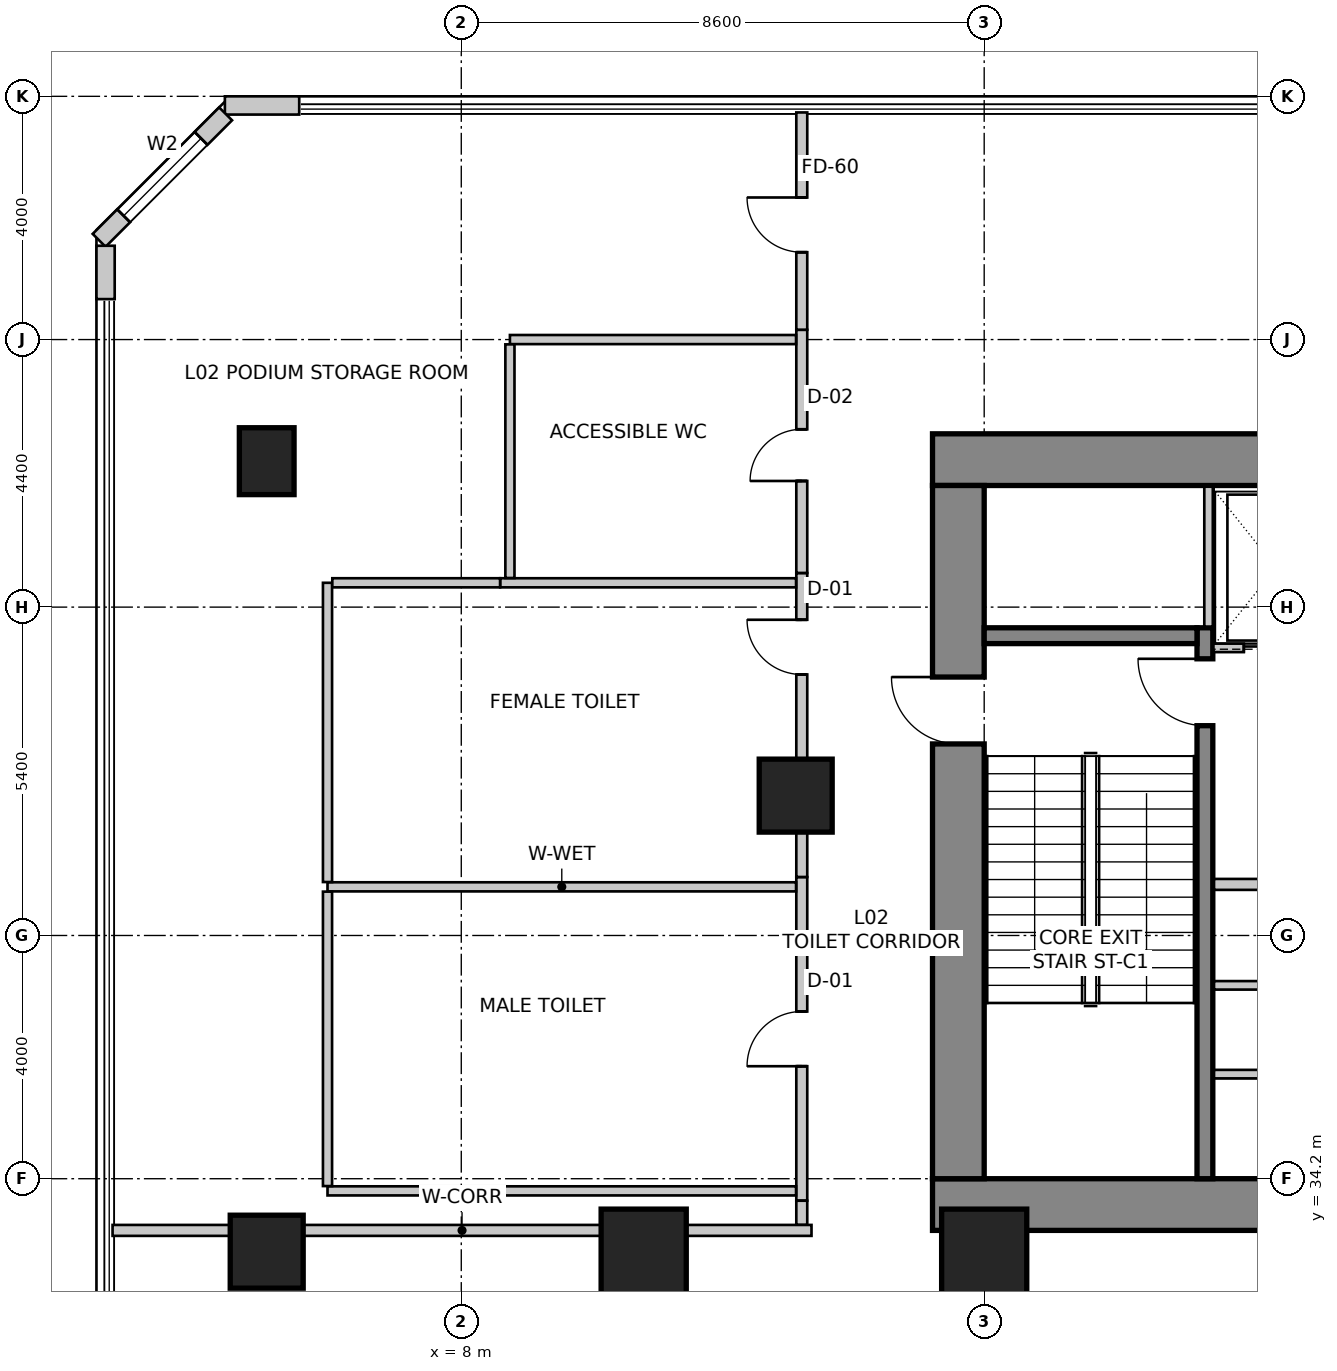
"""IFC4 building model, lengths in metres.
Left out: names, types, materials, properties, quantities, classifications, styles, units other than length and angle.
Written with IfcOpenShell. Run it as: python <this file> out.ifc"""

import sys

from ifc_helpers import new_model, si_unit, direction, frame, frame_2d, origin, origin_2d, place, context, subcontext, project, spatial, rectangle, extrude, source, transform, mapped, element, fill, save


model = new_model("IFC4")
c1 = context("Model", 3, precision=1e-05, world=origin(), true_north=direction((0.0, 1.0)))
c2 = subcontext(c1, "Body", "Model", "MODEL_VIEW")
j1 = project(units=[si_unit("LENGTHUNIT", "METRE"), si_unit("PLANEANGLEUNIT", "RADIAN")], contexts=[c1])
p1 = place(None, origin())
s1 = spatial("IfcSite", under=j1, at=p1, CompositionType="ELEMENT")
p2 = place(p1, origin())
s2 = spatial("IfcBuilding", under=s1, at=p2, CompositionType="ELEMENT")
p3 = place(p2, frame((0.0, 0.0, 6.0)))
s3 = spatial("IfcBuildingStorey", under=s2, at=p3, CompositionType="ELEMENT", Elevation=6.0)
p4 = place(p3, frame((15.75, 46.025, 0.0), z_axis=(0.0, 0.0, 1.0), x_axis=(1.0, 0.0, 0.0)))
e1 = element("IfcWall", 1, at=p4, inside=s3, PredefinedType="SHEAR", context=c2, shape_type="SweptSolid", body=[
    extrude(rectangle(XDim=16.1, YDim=0.85, at=frame_2d((8.05, 0.0))), origin(), (0.0, 0.0, 1.0), 5.2),
])
p5 = place(p3, frame((15.75, 33.775, 0.0), z_axis=(0.0, 0.0, 1.0), x_axis=(1.0, 0.0, 0.0)))
e2 = element("IfcWall", 2, at=p5, inside=s3, PredefinedType="SHEAR", context=c2, shape_type="SweptSolid", body=[
    extrude(rectangle(XDim=16.1, YDim=0.85, at=frame_2d((8.05, 0.0))), origin(), (0.0, 0.0, 1.0), 5.2),
])
m1 = source(origin(), c2, "Body", "SweptSolid", [
    extrude(rectangle(XDim=1.3, YDim=2.15, at=frame_2d((0.65, 1.075))), frame((0.0, 0.435, 0.0), z_axis=(0.0, -1.0, 0.0), x_axis=(1.0, 0.0, 0.0)), (0.0, 0.0, 1.0), 0.87),
])
p6 = place(p5, frame((10.18, 0.0, 0.0)))
e3 = element("IfcOpeningElement", 3, at=p6, cuts=e2, PredefinedType="OPENING", context=c2, shape_type="MappedRepresentation", body=[
    mapped(m1, transform((0.0, 0.0, 0.0), scale=1.0)),
])
p7 = place(p3, frame((16.175, 34.2, 0.0), z_axis=(0.0, 0.0, 1.0), x_axis=(0.0, 1.0, 0.0)))
e4 = element("IfcWall", 4, at=p7, inside=s3, PredefinedType="SHEAR", context=c2, shape_type="SweptSolid", body=[
    extrude(rectangle(XDim=11.4, YDim=0.85, at=frame_2d((5.7, 0.0))), origin(), (0.0, 0.0, 1.0), 5.2),
])
m2 = source(origin(), c2, "Body", "SweptSolid", [
    extrude(rectangle(XDim=1.1, YDim=2.15, at=frame_2d((0.55, 1.075))), frame((0.0, 0.435, 0.0), z_axis=(0.0, -1.0, 0.0), x_axis=(1.0, 0.0, 0.0)), (0.0, 0.0, 1.0), 0.87),
])
p8 = place(p7, frame((7.15, 0.0, 0.0)))
e5 = element("IfcOpeningElement", 5, at=p8, cuts=e4, PredefinedType="OPENING", context=c2, shape_type="MappedRepresentation", body=[
    mapped(m2, transform((0.0, 0.0, 0.0), scale=1.0)),
])
p9 = place(p3, frame((20.23, 34.2, 0.0), z_axis=(0.0, 0.0, 1.0), x_axis=(0.0, 1.0, 0.0)))
e6 = element("IfcWall", 6, at=p9, inside=s3, PredefinedType="SHEAR", context=c2, shape_type="SweptSolid", body=[
    extrude(rectangle(XDim=9.06, YDim=0.26, at=frame_2d((4.53, 0.0))), origin(), (0.0, 0.0, 1.0), 5.2),
])
m3 = source(origin(), c2, "Body", "SweptSolid", [
    extrude(rectangle(XDim=1.1, YDim=2.15, at=frame_2d((0.55, 1.075))), frame((0.0, 0.14, 0.0), z_axis=(0.0, -1.0, 0.0), x_axis=(1.0, 0.0, 0.0)), (0.0, 0.0, 1.0), 0.28),
])
p10 = place(p9, frame((7.45, 0.0, 0.0)))
e7 = element("IfcOpeningElement", 7, at=p10, cuts=e6, PredefinedType="OPENING", context=c2, shape_type="MappedRepresentation", body=[
    mapped(m3, transform((0.0, 0.0, 0.0), scale=1.0)),
])
p11 = place(p3, frame((16.6, 43.13, 0.0), z_axis=(0.0, 0.0, 1.0), x_axis=(1.0, 0.0, 0.0)))
e8 = element("IfcWall", 8, at=p11, inside=s3, PredefinedType="SHEAR", context=c2, shape_type="SweptSolid", body=[
    extrude(rectangle(XDim=3.5, YDim=0.26, at=frame_2d((1.75, 0.0))), origin(), (0.0, 0.0, 1.0), 5.2),
])
m4 = source(origin(), c2, "Body", "SweptSolid", [
    extrude(rectangle(XDim=1.2, YDim=1.2, at=origin_2d()), origin(), (0.0, 0.0, 1.0), 5.2),
])
p12 = place(p3, frame((4.8, 33.0, 0.0), z_axis=(0.0, 0.0, 1.0), x_axis=(1.0, 0.0, 0.0)))
e9 = element("IfcColumn", 9, at=p12, inside=s3, PredefinedType="COLUMN", context=c2, shape_type="MappedRepresentation", body=[
    mapped(m4, transform((0.0, 0.0, 0.0), scale=1.0)),
])
m5 = source(origin(), c2, "Body", "SweptSolid", [
    extrude(rectangle(XDim=1.4, YDim=1.4, at=origin_2d()), origin(), (0.0, 0.0, 1.0), 5.2),
])
for number, where, z_axis, x_axis in (
    (10, (11.0, 33.0, 0.0), (0.0, 0.0, 1.0), (1.0, 0.0, 0.0)),
    (11, (16.6, 33.0, 0.0), (0.0, 0.0, 1.0), (1.0, 0.0, 0.0)),
):
    element("IfcColumn", number, at=place(p3, frame(where, z_axis=z_axis, x_axis=x_axis)), inside=s3, PredefinedType="COLUMN", context=c2, shape_type="MappedRepresentation", body=[
        mapped(m5, transform((0.0, 0.0, 0.0), scale=1.0)),
    ])
m6 = source(origin(), c2, "Body", "SweptSolid", [
    extrude(rectangle(XDim=0.9, YDim=1.1, at=origin_2d()), origin(), (0.0, 0.0, 1.0), 5.2),
])
p13 = place(p3, frame((4.8, 46.0, 0.0), z_axis=(0.0, 0.0, 1.0), x_axis=(1.0, 0.0, 0.0)))
e12 = element("IfcColumn", 12, at=p13, inside=s3, PredefinedType="COLUMN", context=c2, shape_type="MappedRepresentation", body=[
    mapped(m6, transform((0.0, 0.0, 0.0), scale=1.0)),
])
p14 = place(p3, frame((13.5, 40.5, 0.0), z_axis=(0.0, 0.0, 1.0), x_axis=(1.0, 0.0, 0.0)))
e13 = element("IfcColumn", 13, at=p14, inside=s3, PredefinedType="COLUMN", context=c2, shape_type="MappedRepresentation", body=[
    mapped(m4, transform((0.0, 0.0, 0.0), scale=1.0)),
])
p15 = place(p3, frame((5.335, 51.85, 0.0), z_axis=(0.0, 0.0, 1.0), x_axis=(-1.0, 0.0, 0.0)))
e14 = element("IfcWall", 14, at=p15, inside=s3, PredefinedType="SOLIDWALL", context=c2, shape_type="SweptSolid", body=[
    extrude(rectangle(XDim=1.223, YDim=0.3, at=frame_2d((0.611, 0.0))), origin(), (0.0, 0.0, 1.0), 4.9),
])
p16 = place(p3, frame((4.124, 51.712, 0.0), z_axis=(0.0, 0.0, 1.0), x_axis=(-0.707106781187, -0.707106781187, 0.0)))
e15 = element("IfcWall", 15, at=p16, inside=s3, PredefinedType="SOLIDWALL", context=c2, shape_type="SweptSolid", body=[
    extrude(rectangle(XDim=2.942, YDim=0.3, at=frame_2d((1.471, 0.0))), origin(), (0.0, 0.0, 1.0), 4.9),
])
m7 = source(origin(), c2, "Body", "SweptSolid", [
    extrude(rectangle(XDim=1.8, YDim=2.1, at=frame_2d((0.9, 1.05))), frame((0.0, 0.16, 0.0), z_axis=(0.0, -1.0, 0.0), x_axis=(1.0, 0.0, 0.0)), (0.0, 0.0, 1.0), 0.32),
])
p17 = place(p16, frame((0.571, 0.0, 0.85)))
e16 = element("IfcOpeningElement", 16, at=p17, cuts=e15, PredefinedType="OPENING", context=c2, shape_type="MappedRepresentation", body=[
    mapped(m7, transform((0.0, 0.0, 0.0), scale=1.0)),
])
p18 = place(p3, frame((2.15, 49.543, 0.0), z_axis=(0.0, 0.0, 1.0), x_axis=(0.0, -1.0, 0.0)))
e17 = element("IfcWall", 17, at=p18, inside=s3, PredefinedType="SOLIDWALL", context=c2, shape_type="SweptSolid", body=[
    extrude(rectangle(XDim=0.877, YDim=0.3, at=frame_2d((0.439, 0.0))), origin(), (0.0, 0.0, 1.0), 4.9),
])
p19 = place(p3, frame((20.37, 42.93, 0.0), z_axis=(0.0, 0.0, 1.0), x_axis=(1.0, 0.0, 0.0)))
e18 = element("IfcWall", 18, at=p19, inside=s3, PredefinedType="SOLIDWALL", context=c2, shape_type="SweptSolid", body=[
    extrude(rectangle(XDim=6.86, YDim=0.14, at=frame_2d((3.43, 0.0))), origin(), (0.0, 0.0, 1.0), 4.9),
])
m8 = source(origin(), c2, "Body", "SweptSolid", [
    extrude(rectangle(XDim=1.1, YDim=2.15, at=frame_2d((0.55, 1.075))), frame((0.0, 0.08, 0.0), z_axis=(0.0, -1.0, 0.0), x_axis=(1.0, 0.0, 0.0)), (0.0, 0.0, 1.0), 0.16),
])
p20 = place(p19, frame((0.5, 0.0, 0.0)))
e19 = element("IfcOpeningElement", 19, at=p20, cuts=e18, PredefinedType="OPENING", context=c2, shape_type="MappedRepresentation", body=[
    mapped(m8, transform((0.0, 0.0, 0.0), scale=1.0)),
])
p21 = place(p19, frame((2.7, 0.0, 0.0)))
e20 = element("IfcOpeningElement", 20, at=p21, cuts=e18, PredefinedType="OPENING", context=c2, shape_type="MappedRepresentation", body=[
    mapped(m8, transform((0.0, 0.0, 0.0), scale=1.0)),
])
p22 = place(p19, frame((5.1, 0.0, 0.0)))
e21 = element("IfcOpeningElement", 21, at=p22, cuts=e18, PredefinedType="OPENING", context=c2, shape_type="MappedRepresentation", body=[
    mapped(m8, transform((0.0, 0.0, 0.0), scale=1.0)),
])
p23 = place(p3, frame((20.29, 43.28, 0.0), z_axis=(0.0, 0.0, 1.0), x_axis=(0.0, 1.0, 0.0)))
e22 = element("IfcWall", 22, at=p23, inside=s3, PredefinedType="SOLIDWALL", context=c2, shape_type="SweptSolid", body=[
    extrude(rectangle(XDim=2.3, YDim=0.14, at=frame_2d((1.15, 0.0))), origin(), (0.0, 0.0, 1.0), 4.9),
])
p24 = place(p3, frame((20.38, 35.92, 0.0), z_axis=(0.0, 0.0, 1.0), x_axis=(1.0, 0.0, 0.0)))
e23 = element("IfcWall", 23, at=p24, inside=s3, PredefinedType="SOLIDWALL", context=c2, shape_type="SweptSolid", body=[
    extrude(rectangle(XDim=5.65, YDim=0.14, at=frame_2d((2.825, 0.0))), origin(), (0.0, 0.0, 1.0), 4.9),
])
p25 = place(p3, frame((20.38, 37.38, 0.0), z_axis=(0.0, 0.0, 1.0), x_axis=(1.0, 0.0, 0.0)))
e24 = element("IfcWall", 24, at=p25, inside=s3, PredefinedType="SOLIDWALL", context=c2, shape_type="SweptSolid", body=[
    extrude(rectangle(XDim=5.75, YDim=0.14, at=frame_2d((2.875, 0.0))), origin(), (0.0, 0.0, 1.0), 4.9),
])
p26 = place(p3, frame((20.38, 39.04, 0.0), z_axis=(0.0, 0.0, 1.0), x_axis=(1.0, 0.0, 0.0)))
e25 = element("IfcWall", 25, at=p26, inside=s3, PredefinedType="SOLIDWALL", context=c2, shape_type="SweptSolid", body=[
    extrude(rectangle(XDim=5.75, YDim=0.18, at=frame_2d((2.875, 0.0))), origin(), (0.0, 0.0, 1.0), 4.9),
])
p27 = place(p3, frame((2.265, 33.35, 0.0), z_axis=(0.0, 0.0, 1.0), x_axis=(1.0, 0.0, 0.0)))
e26 = element("IfcWall", 26, at=p27, inside=s3, PredefinedType="PARTITIONING", context=c2, shape_type="SweptSolid", body=[
    extrude(rectangle(XDim=11.495, YDim=0.18, at=frame_2d((5.748, 0.0))), origin(), (0.0, 0.0, 1.0), 3.692),
])
p28 = place(p3, frame((13.6, 33.84, 0.0), z_axis=(0.0, 0.0, 1.0), x_axis=(0.0, 1.0, 0.0)))
e27 = element("IfcWall", 27, at=p28, inside=s3, PredefinedType="PARTITIONING", context=c2, shape_type="SweptSolid", body=[
    extrude(rectangle(XDim=5.32, YDim=0.18, at=frame_2d((2.66, 0.0))), origin(), (0.0, 0.0, 1.0), 4.9),
])
m9 = source(origin(), c2, "Body", "SweptSolid", [
    extrude(rectangle(XDim=0.9, YDim=2.15, at=frame_2d((0.45, 1.075))), frame((0.0, 0.1, 0.0), z_axis=(0.0, -1.0, 0.0), x_axis=(1.0, 0.0, 0.0)), (0.0, 0.0, 1.0), 0.2),
])
p29 = place(p28, frame((2.21, 0.0, 0.0)))
e28 = element("IfcOpeningElement", 28, at=p29, cuts=e27, PredefinedType="OPENING", context=c2, shape_type="MappedRepresentation", body=[
    mapped(m9, transform((0.0, 0.0, 0.0), scale=1.0)),
])
p30 = place(p3, frame((13.6, 39.162, 0.0), z_axis=(0.0, 0.0, 1.0), x_axis=(0.0, 1.0, 0.0)))
e29 = element("IfcWall", 29, at=p30, inside=s3, PredefinedType="PARTITIONING", context=c2, shape_type="SweptSolid", body=[
    extrude(rectangle(XDim=4.998, YDim=0.18, at=frame_2d((2.499, 0.0))), origin(), (0.0, 0.0, 1.0), 3.942),
])
p31 = place(p30, frame((3.33, 0.0, 0.0)))
e30 = element("IfcOpeningElement", 30, at=p31, cuts=e29, PredefinedType="OPENING", context=c2, shape_type="MappedRepresentation", body=[
    mapped(m9, transform((0.0, 0.0, 0.0), scale=1.0)),
])
p32 = place(p3, frame((13.6, 44.162, 0.0), z_axis=(0.0, 0.0, 1.0), x_axis=(0.0, 1.0, 0.0)))
e31 = element("IfcWall", 31, at=p32, inside=s3, PredefinedType="PARTITIONING", context=c2, shape_type="SweptSolid", body=[
    extrude(rectangle(XDim=3.998, YDim=0.18, at=frame_2d((1.999, 0.0))), origin(), (0.0, 0.0, 1.0), 4.9),
])
m10 = source(origin(), c2, "Body", "SweptSolid", [
    extrude(rectangle(XDim=0.85, YDim=2.15, at=frame_2d((0.425, 1.075))), frame((0.0, 0.1, 0.0), z_axis=(0.0, -1.0, 0.0), x_axis=(1.0, 0.0, 0.0)), (0.0, 0.0, 1.0), 0.2),
])
p33 = place(p32, frame((1.512, 0.0, 0.0)))
e32 = element("IfcOpeningElement", 32, at=p33, cuts=e31, PredefinedType="OPENING", context=c2, shape_type="MappedRepresentation", body=[
    mapped(m10, transform((0.0, 0.0, 0.0), scale=1.0)),
])
p34 = place(p3, frame((13.6, 48.162, 0.0), z_axis=(0.0, 0.0, 1.0), x_axis=(0.0, 1.0, 0.0)))
e33 = element("IfcWall", 33, at=p34, inside=s3, PredefinedType="PARTITIONING", context=c2, shape_type="SweptSolid", body=[
    extrude(rectangle(XDim=3.573, YDim=0.18, at=frame_2d((1.787, 0.0))), origin(), (0.0, 0.0, 1.0), 4.9),
])
p35 = place(p34, frame((1.274, 0.0, 0.0)))
e34 = element("IfcOpeningElement", 34, at=p35, cuts=e33, PredefinedType="OPENING", context=c2, shape_type="MappedRepresentation", body=[
    mapped(m9, transform((0.0, 0.0, 0.0), scale=1.0)),
])
p36 = place(p3, frame((13.6, 33.444, 0.0), z_axis=(0.0, 0.0, 1.0), x_axis=(0.0, 1.0, 0.0)))
e35 = element("IfcWall", 35, at=p36, inside=s3, PredefinedType="PARTITIONING", context=c2, shape_type="SweptSolid", body=[
    extrude(rectangle(XDim=0.394, YDim=0.18, at=frame_2d((0.197, 0.0))), origin(), (0.0, 0.0, 1.0), 4.9),
])
for number, where, z_axis, x_axis in (
    (36, (5.8, 39.0, 0.0), (0.0, 0.0, 1.0), (1.0, 0.0, 0.0)),
    (37, (13.506, 34.0, 0.0), (0.0, 0.0, 1.0), (-1.0, 0.0, 0.0)),
):
    element("IfcWall", number, at=place(p3, frame(where, z_axis=z_axis, x_axis=x_axis)), inside=s3, PredefinedType="PARTITIONING", context=c2, shape_type="SweptSolid", body=[
        extrude(rectangle(XDim=7.706, YDim=0.15, at=frame_2d((3.853, 0.0))), origin(), (0.0, 0.0, 1.0), 3.942),
    ])
p37 = place(p3, frame((5.8, 34.079, 0.0), z_axis=(0.0, 0.0, 1.0), x_axis=(0.0, 1.0, 0.0)))
e38 = element("IfcWall", 38, at=p37, inside=s3, PredefinedType="PARTITIONING", context=c2, shape_type="SweptSolid", body=[
    extrude(rectangle(XDim=4.842, YDim=0.15, at=frame_2d((2.421, 0.0))), origin(), (0.0, 0.0, 1.0), 4.9),
])
p38 = place(p3, frame((8.64, 44.0, 0.0), z_axis=(0.0, 0.0, 1.0), x_axis=(1.0, 0.0, 0.0)))
e39 = element("IfcWall", 39, at=p38, inside=s3, PredefinedType="PARTITIONING", context=c2, shape_type="SweptSolid", body=[
    extrude(rectangle(XDim=4.866, YDim=0.15, at=frame_2d((2.433, 0.0))), origin(), (0.0, 0.0, 1.0), 4.9),
])
p39 = place(p3, frame((5.8, 39.079, 0.0), z_axis=(0.0, 0.0, 1.0), x_axis=(0.0, 1.0, 0.0)))
e40 = element("IfcWall", 40, at=p39, inside=s3, PredefinedType="PARTITIONING", context=c2, shape_type="SweptSolid", body=[
    extrude(rectangle(XDim=4.921, YDim=0.15, at=frame_2d((2.46, 0.0))), origin(), (0.0, 0.0, 1.0), 4.9),
])
p40 = place(p3, frame((5.879, 44.0, 0.0), z_axis=(0.0, 0.0, 1.0), x_axis=(1.0, 0.0, 0.0)))
e41 = element("IfcWall", 41, at=p40, inside=s3, PredefinedType="PARTITIONING", context=c2, shape_type="SweptSolid", body=[
    extrude(rectangle(XDim=2.759, YDim=0.15, at=frame_2d((1.379, 0.0))), origin(), (0.0, 0.0, 1.0), 3.942),
])
p41 = place(p3, frame((8.8, 48.0, 0.0), z_axis=(0.0, 0.0, 1.0), x_axis=(1.0, 0.0, 0.0)))
e42 = element("IfcWall", 42, at=p41, inside=s3, PredefinedType="PARTITIONING", context=c2, shape_type="SweptSolid", body=[
    extrude(rectangle(XDim=4.706, YDim=0.15, at=frame_2d((2.353, 0.0))), origin(), (0.0, 0.0, 1.0), 4.9),
])
p42 = place(p3, frame((8.8, 44.079, 0.0), z_axis=(0.0, 0.0, 1.0), x_axis=(0.0, 1.0, 0.0)))
e43 = element("IfcWall", 43, at=p42, inside=s3, PredefinedType="PARTITIONING", context=c2, shape_type="SweptSolid", body=[
    extrude(rectangle(XDim=3.842, YDim=0.15, at=frame_2d((1.921, 0.0))), origin(), (0.0, 0.0, 1.0), 4.9),
])
m11 = source(origin(), c2, "Body", "SweptSolid", [
    extrude(rectangle(XDim=1.8, YDim=2.1, at=frame_2d((0.9, 1.05))), frame((0.0, -0.015, 0.0), z_axis=(0.0, -1.0, 0.0), x_axis=(1.0, 0.0, 0.0)), (0.0, 0.0, 1.0), 0.06),
])
p43 = place(p17, origin())
e44 = element("IfcWindow", 44, at=p43, inside=s3, PartitioningType="SINGLE_PANEL", PredefinedType="WINDOW", context=c2, shape_type="MappedRepresentation", body=[
    mapped(m11, transform((0.0, 0.0, 0.0), scale=1.0)),
])
fill(e16, e44)
m12 = source(origin(), c2, "Body", "SweptSolid", [
    extrude(rectangle(XDim=1.1, YDim=2.15, at=frame_2d((0.55, 1.075))), frame((0.0, 0.025, 0.0), z_axis=(0.0, -1.0, 0.0), x_axis=(1.0, 0.0, 0.0)), (0.0, 0.0, 1.0), 0.05),
])
p44 = place(p20, origin())
e45 = element("IfcDoor", 45, at=p44, inside=s3, OperationType="SLIDING_TO_LEFT", PredefinedType="DOOR", context=c2, shape_type="MappedRepresentation", body=[
    mapped(m12, transform((0.0, 0.0, 0.0), scale=1.0)),
])
fill(e19, e45)
m13 = source(origin(), c2, "Body", "SweptSolid", [
    extrude(rectangle(XDim=1.1, YDim=2.15, at=frame_2d((0.55, 1.075))), frame((0.0, 0.025, 0.0), z_axis=(0.0, -1.0, 0.0), x_axis=(1.0, 0.0, 0.0)), (0.0, 0.0, 1.0), 0.05),
])
p45 = place(p10, origin())
e46 = element("IfcDoor", 46, at=p45, inside=s3, OperationType="SINGLE_SWING_RIGHT", PredefinedType="DOOR", context=c2, shape_type="MappedRepresentation", body=[
    mapped(m13, transform((0.0, 0.0, 0.0), scale=1.0)),
])
fill(e7, e46)
p46 = place(p8, origin())
e47 = element("IfcDoor", 47, at=p46, inside=s3, OperationType="SINGLE_SWING_RIGHT", PredefinedType="DOOR", context=c2, shape_type="MappedRepresentation", body=[
    mapped(m13, transform((0.0, 0.0, 0.0), scale=1.0)),
])
fill(e5, e47)
m14 = source(origin(), c2, "Body", "SweptSolid", [
    extrude(rectangle(XDim=0.9, YDim=2.15, at=frame_2d((0.45, 1.075))), frame((0.0, 0.025, 0.0), z_axis=(0.0, -1.0, 0.0), x_axis=(1.0, 0.0, 0.0)), (0.0, 0.0, 1.0), 0.05),
])
p47 = place(p29, origin())
e48 = element("IfcDoor", 48, at=p47, inside=s3, OperationType="SINGLE_SWING_LEFT", PredefinedType="DOOR", context=c2, shape_type="MappedRepresentation", body=[
    mapped(m14, transform((0.0, 0.0, 0.0), scale=1.0)),
])
fill(e28, e48)
p48 = place(p31, origin())
e49 = element("IfcDoor", 49, at=p48, inside=s3, OperationType="SINGLE_SWING_RIGHT", PredefinedType="DOOR", context=c2, shape_type="MappedRepresentation", body=[
    mapped(m14, transform((0.0, 0.0, 0.0), scale=1.0)),
])
fill(e30, e49)
m15 = source(origin(), c2, "Body", "SweptSolid", [
    extrude(rectangle(XDim=0.85, YDim=2.15, at=frame_2d((0.425, 1.075))), frame((0.0, 0.025, 0.0), z_axis=(0.0, -1.0, 0.0), x_axis=(1.0, 0.0, 0.0)), (0.0, 0.0, 1.0), 0.05),
])
p49 = place(p33, origin())
e50 = element("IfcDoor", 50, at=p49, inside=s3, OperationType="SINGLE_SWING_LEFT", PredefinedType="DOOR", context=c2, shape_type="MappedRepresentation", body=[
    mapped(m15, transform((0.0, 0.0, 0.0), scale=1.0)),
])
fill(e32, e50)
m16 = source(origin(), c2, "Body", "SweptSolid", [
    extrude(rectangle(XDim=0.9, YDim=2.15, at=frame_2d((0.45, 1.075))), frame((0.0, 0.025, 0.0), z_axis=(0.0, -1.0, 0.0), x_axis=(1.0, 0.0, 0.0)), (0.0, 0.0, 1.0), 0.05),
])
p50 = place(p35, origin())
e51 = element("IfcDoor", 51, at=p50, inside=s3, OperationType="SINGLE_SWING_RIGHT", PredefinedType="DOOR", context=c2, shape_type="MappedRepresentation", body=[
    mapped(m16, transform((0.0, 0.0, 0.0), scale=1.0)),
])
fill(e34, e51)
save(model, sys.argv[1])
